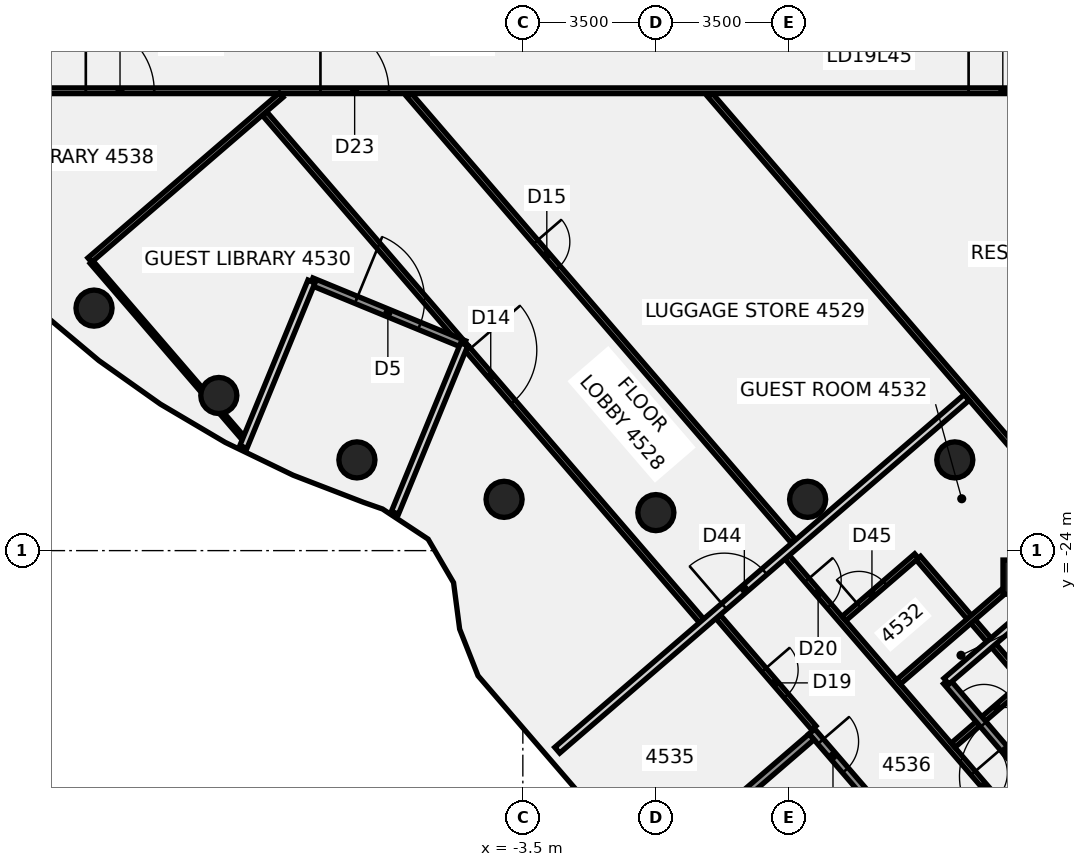
"""IFC4 building model, lengths in metres.
Left out: names, types, materials, properties, quantities, classifications, styles, units other than length and angle.
Written with IfcOpenShell. Run it as: python <this file> out.ifc"""

import sys

from ifc_helpers import new_model, si_unit, direction, frame, frame_2d, origin, origin_2d, place, context, subcontext, project, spatial, rectangle, circle, extrude, element, fill, save


model = new_model("IFC4")
c1 = context("Model", 3, precision=1e-05, world=origin(), true_north=direction((0.0, 1.0)))
c2 = subcontext(c1, "Body", "Model", "MODEL_VIEW")
j1 = project(units=[si_unit("LENGTHUNIT", "METRE"), si_unit("PLANEANGLEUNIT", "RADIAN")], contexts=[c1])
p1 = place(None, origin())
s1 = spatial("IfcSite", under=j1, at=p1, CompositionType="ELEMENT")
p2 = place(p1, origin())
s2 = spatial("IfcBuilding", under=s1, at=p2, CompositionType="ELEMENT")
p3 = place(p2, frame((0.0, 0.0, 182.5)))
s3 = spatial("IfcBuildingStorey", under=s2, at=p3, CompositionType="ELEMENT", Elevation=182.5)
for number, where, z_axis, x_axis in (
    (1, (-14.784, -17.619, -0.14), (0.0, 0.0, 1.0), (1.0, 0.0, 0.0)),
    (2, (-11.5, -19.919, -0.14), (0.0, 0.0, 1.0), (1.0, 0.0, 0.0)),
    (3, (-7.866, -21.613, -0.14), (0.0, 0.0, 1.0), (1.0, 0.0, 0.0)),
    (4, (-3.994, -22.651, -0.14), (0.0, 0.0, 1.0), (1.0, 0.0, 0.0)),
    (5, (0.0, -23.0, -0.14), (0.0, 0.0, 1.0), (1.0, 0.0, 0.0)),
    (6, (3.994, -22.651, -0.14), (0.0, 0.0, 1.0), (1.0, 0.0, 0.0)),
    (7, (7.866, -21.613, -0.14), (0.0, 0.0, 1.0), (1.0, 0.0, 0.0)),
):
    element("IfcColumn", number, at=place(p3, frame(where, z_axis=z_axis, x_axis=x_axis)), inside=s3, PredefinedType="COLUMN", context=c2, shape_type="SweptSolid", body=[
        extrude(circle(Radius=0.475, at=origin_2d()), origin(), (0.0, 0.0, 1.0), 3.6),
    ])
p4 = place(p3, frame((9.584, -24.698, -0.135), z_axis=(0.013229584391, 0.048576320124, 0.998731855515), x_axis=(-0.757717932984, -0.651247732409, 0.04171240903)))
e8 = element("IfcColumn", 8, at=p4, inside=s3, PredefinedType="COLUMN", context=c2, shape_type="SweptSolid", body=[
    extrude(rectangle(XDim=0.9, YDim=0.9, at=origin_2d()), origin(), (0.0, 0.0, 1.0), 3.599),
])
p5 = place(p3, frame((-14.847, -16.411, 0.0), z_axis=(0.0, 0.0, 1.0), x_axis=(0.652680882715, -0.757632935753, 0.0)))
e9 = element("IfcWall", 9, at=p5, inside=s3, PredefinedType="PARTITIONING", context=c2, shape_type="SweptSolid", body=[
    extrude(rectangle(XDim=4.443, YDim=0.1, at=frame_2d((2.222, 0.0))), origin(), (0.0, 0.0, 1.0), 2.864),
])
p6 = place(p3, frame((-11.425, -20.383, 0.0), z_axis=(0.0, 0.0, 1.0), x_axis=(0.652545214722, -0.757749789009, 0.0)))
e10 = element("IfcWall", 10, at=p6, inside=s3, PredefinedType="PARTITIONING", context=c2, shape_type="SweptSolid", body=[
    extrude(rectangle(XDim=0.882, YDim=0.1, at=frame_2d((0.441, 0.0))), origin(), (0.0, 0.0, 1.0), 2.864),
])
p7 = place(p3, frame((-10.298, -12.499, 0.0), z_axis=(0.0, 0.0, 1.0), x_axis=(0.652713185698, -0.757605106382, 0.0)))
e11 = element("IfcWall", 11, at=p7, inside=s3, PredefinedType="PARTITIONING", context=c2, shape_type="SweptSolid", body=[
    extrude(rectangle(XDim=17.62, YDim=0.15, at=frame_2d((8.81, 0.0))), origin(), (0.0, 0.0, 1.0), 2.864),
])
p8 = place(p7, frame((8.22, 0.0, 0.0)))
e12 = element("IfcOpeningElement", 12, at=p8, cuts=e11, PredefinedType="OPENING", context=c2, shape_type="SweptSolid", body=[
    extrude(rectangle(XDim=1.8, YDim=2.1, at=frame_2d((0.9, 1.05))), frame((0.0, 0.085, 0.0), z_axis=(0.0, -1.0, 0.0), x_axis=(1.0, 0.0, 0.0)), (0.0, 0.0, 1.0), 0.17),
])
p9 = place(p3, frame((-6.499, -12.006, 0.0), z_axis=(0.0, 0.0, 1.0), x_axis=(0.65272794867, -0.757592387122, 0.0)))
e13 = element("IfcWall", 13, at=p9, inside=s3, PredefinedType="PARTITIONING", context=c2, shape_type="SweptSolid", body=[
    extrude(rectangle(XDim=15.494, YDim=0.15, at=frame_2d((7.747, 0.0))), origin(), (0.0, 0.0, 1.0), 2.864),
])
p10 = place(p9, frame((5.11, 0.0, 0.0)))
e14 = element("IfcOpeningElement", 14, at=p10, cuts=e13, PredefinedType="OPENING", context=c2, shape_type="SweptSolid", body=[
    extrude(rectangle(XDim=0.9, YDim=2.1, at=frame_2d((0.45, 1.05))), frame((0.0, 0.085, 0.0), z_axis=(0.0, -1.0, 0.0), x_axis=(1.0, 0.0, 0.0)), (0.0, 0.0, 1.0), 0.17),
])
p11 = place(p3, frame((1.421, -12.006, 0.0), z_axis=(0.0, 0.0, 1.0), x_axis=(0.652713345428, -0.757604968767, 0.0)))
e15 = element("IfcWall", 15, at=p11, inside=s3, PredefinedType="PARTITIONING", context=c2, shape_type="SweptSolid", body=[
    extrude(rectangle(XDim=14.473, YDim=0.15, at=frame_2d((7.236, 0.0))), origin(), (0.0, 0.0, 1.0), 2.864),
])
p12 = place(p3, frame((1.636, -25.738, 0.0), z_axis=(0.0, 0.0, 1.0), x_axis=(0.652804508679, -0.757526417657, 0.0)))
e16 = element("IfcWall", 16, at=p12, inside=s3, PredefinedType="PARTITIONING", context=c2, shape_type="SweptSolid", body=[
    extrude(rectangle(XDim=3.861, YDim=0.15, at=frame_2d((1.93, 0.0))), origin(), (0.0, 0.0, 1.0), 2.864),
])
p13 = place(p12, frame((1.85, 0.0, 0.0)))
e17 = element("IfcOpeningElement", 17, at=p13, cuts=e16, PredefinedType="OPENING", context=c2, shape_type="SweptSolid", body=[
    extrude(rectangle(XDim=0.9, YDim=2.1, at=frame_2d((0.45, 1.05))), frame((0.0, 0.085, 0.0), z_axis=(0.0, -1.0, 0.0), x_axis=(1.0, 0.0, 0.0)), (0.0, 0.0, 1.0), 0.17),
])
p14 = place(p3, frame((3.454, -24.172, 0.0), z_axis=(0.0, 0.0, 1.0), x_axis=(0.652748517357, -0.757574665025, 0.0)))
e18 = element("IfcWall", 18, at=p14, inside=s3, PredefinedType="PARTITIONING", context=c2, shape_type="SweptSolid", body=[
    extrude(rectangle(XDim=13.32, YDim=0.15, at=frame_2d((6.66, 0.0))), origin(), (0.0, 0.0, 1.0), 2.864),
])
p15 = place(p14, frame((0.8, 0.0, 0.0)))
e19 = element("IfcOpeningElement", 19, at=p15, cuts=e18, PredefinedType="OPENING", context=c2, shape_type="SweptSolid", body=[
    extrude(rectangle(XDim=0.9, YDim=2.1, at=frame_2d((0.45, 1.05))), frame((0.0, 0.085, 0.0), z_axis=(0.0, -1.0, 0.0), x_axis=(1.0, 0.0, 0.0)), (0.0, 0.0, 1.0), 0.17),
])
p16 = place(p14, frame((7.5, 0.0, 0.0)))
e20 = element("IfcOpeningElement", 20, at=p16, cuts=e18, PredefinedType="OPENING", context=c2, shape_type="SweptSolid", body=[
    extrude(rectangle(XDim=0.9, YDim=2.1, at=frame_2d((0.45, 1.05))), frame((0.0, 0.085, 0.0), z_axis=(0.0, -1.0, 0.0), x_axis=(1.0, 0.0, 0.0)), (0.0, 0.0, 1.0), 0.17),
])
p17 = place(p14, frame((9.8, 0.0, 0.0)))
e21 = element("IfcOpeningElement", 21, at=p17, cuts=e18, PredefinedType="OPENING", context=c2, shape_type="SweptSolid", body=[
    extrude(rectangle(XDim=0.9, YDim=2.1, at=frame_2d((0.45, 1.05))), frame((0.0, 0.085, 0.0), z_axis=(0.0, -1.0, 0.0), x_axis=(1.0, 0.0, 0.0)), (0.0, 0.0, 1.0), 0.17),
])
p18 = place(p3, frame((6.909, -24.198, 0.0), z_axis=(0.0, 0.0, 1.0), x_axis=(0.652677065628, -0.757636224057, 0.0)))
e22 = element("IfcWall", 22, at=p18, inside=s3, PredefinedType="PARTITIONING", context=c2, shape_type="SweptSolid", body=[
    extrude(rectangle(XDim=4.25, YDim=0.15, at=frame_2d((2.125, 0.0))), origin(), (0.0, 0.0, 1.0), 2.864),
])
p19 = place(p3, frame((-17.1, -11.9, 0.0), z_axis=(0.0, 0.0, 1.0), x_axis=(1.0, 0.0, 0.0)))
e23 = element("IfcWall", 23, at=p19, inside=s3, PredefinedType="PARTITIONING", context=c2, shape_type="SweptSolid", body=[
    extrude(rectangle(XDim=34.165, YDim=0.15, at=frame_2d((17.083, 0.0))), origin(), (0.0, 0.0, 1.0), 2.864),
])
p20 = place(p19, frame((8.274, 0.0, 0.0)))
e24 = element("IfcOpeningElement", 24, at=p20, cuts=e23, PredefinedType="OPENING", context=c2, shape_type="SweptSolid", body=[
    extrude(rectangle(XDim=1.8, YDim=2.1, at=frame_2d((0.9, 1.05))), frame((0.0, 0.085, 0.0), z_axis=(0.0, -1.0, 0.0), x_axis=(1.0, 0.0, 0.0)), (0.0, 0.0, 1.0), 0.17),
])
p21 = place(p19, frame((2.1, 0.0, 0.0)))
e25 = element("IfcOpeningElement", 25, at=p21, cuts=e23, PredefinedType="OPENING", context=c2, shape_type="SweptSolid", body=[
    extrude(rectangle(XDim=1.8, YDim=2.1, at=frame_2d((0.9, 1.05))), frame((0.0, 0.085, 0.0), z_axis=(0.0, -1.0, 0.0), x_axis=(1.0, 0.0, 0.0)), (0.0, 0.0, 1.0), 0.17),
])
p22 = place(p19, frame((25.33, 0.0, 0.0)))
e26 = element("IfcOpeningElement", 26, at=p22, cuts=e23, PredefinedType="OPENING", context=c2, shape_type="SweptSolid", body=[
    extrude(rectangle(XDim=1.8, YDim=2.1, at=frame_2d((0.9, 1.05))), frame((0.0, 0.085, 0.0), z_axis=(0.0, -1.0, 0.0), x_axis=(1.0, 0.0, 0.0)), (0.0, 0.0, 1.0), 0.17),
])
p23 = place(p3, frame((-14.896, -16.354, 0.0), z_axis=(0.0, 0.0, 1.0), x_axis=(0.757644724188, 0.652667198432, 0.0)))
e27 = element("IfcWall", 27, at=p23, inside=s3, PredefinedType="PARTITIONING", context=c2, shape_type="SweptSolid", body=[
    extrude(rectangle(XDim=6.649, YDim=0.15, at=frame_2d((3.324, 0.0))), origin(), (0.0, 0.0, 1.0), 2.864),
])
p24 = place(p3, frame((-2.595, -29.251, 0.0), z_axis=(0.0, 0.0, 1.0), x_axis=(0.757604641141, 0.652713725704, 0.0)))
e28 = element("IfcWall", 28, at=p24, inside=s3, PredefinedType="PARTITIONING", context=c2, shape_type="SweptSolid", body=[
    extrude(rectangle(XDim=14.219, YDim=0.2, at=frame_2d((7.109, 0.0))), origin(), (0.0, 0.0, 1.0), 2.864),
])
p25 = place(p24, frame((5.799, 0.0, 0.0)))
e29 = element("IfcOpeningElement", 29, at=p25, cuts=e28, PredefinedType="OPENING", context=c2, shape_type="SweptSolid", body=[
    extrude(rectangle(XDim=1.4, YDim=2.1, at=frame_2d((0.7, 1.05))), frame((0.0, 0.11, 0.0), z_axis=(0.0, -1.0, 0.0), x_axis=(1.0, 0.0, 0.0)), (0.0, 0.0, 1.0), 0.22),
])
p26 = place(p3, frame((4.952, -25.786, 0.0), z_axis=(0.0, 0.0, 1.0), x_axis=(0.757495885979, 0.652839936528, 0.0)))
e30 = element("IfcWall", 30, at=p26, inside=s3, PredefinedType="PARTITIONING", context=c2, shape_type="SweptSolid", body=[
    extrude(rectangle(XDim=2.52, YDim=0.15, at=frame_2d((1.26, 0.0))), origin(), (0.0, 0.0, 1.0), 2.864),
])
p27 = place(p26, frame((0.52, 0.0, 0.0)))
e31 = element("IfcOpeningElement", 31, at=p27, cuts=e30, PredefinedType="OPENING", context=c2, shape_type="SweptSolid", body=[
    extrude(rectangle(XDim=0.9, YDim=2.1, at=frame_2d((0.45, 1.05))), frame((0.0, 0.085, 0.0), z_axis=(0.0, -1.0, 0.0), x_axis=(1.0, 0.0, 0.0)), (0.0, 0.0, 1.0), 0.17),
])
p28 = place(p3, frame((6.388, -27.453, 0.0), z_axis=(0.0, 0.0, 1.0), x_axis=(0.757450861075, 0.652892175674, 0.0)))
e32 = element("IfcWall", 32, at=p28, inside=s3, PredefinedType="PARTITIONING", context=c2, shape_type="SweptSolid", body=[
    extrude(rectangle(XDim=3.766, YDim=0.15, at=frame_2d((1.883, 0.0))), origin(), (0.0, 0.0, 1.0), 2.864),
])
p29 = place(p3, frame((7.823, -29.119, 0.0), z_axis=(0.0, 0.0, 1.0), x_axis=(0.757495885979, 0.652839936528, 0.0)))
e33 = element("IfcWall", 33, at=p29, inside=s3, PredefinedType="PARTITIONING", context=c2, shape_type="SweptSolid", body=[
    extrude(rectangle(XDim=2.52, YDim=0.15, at=frame_2d((1.26, 0.0))), origin(), (0.0, 0.0, 1.0), 2.864),
])
p30 = place(p29, frame((1.07, 0.0, 0.0)))
e34 = element("IfcOpeningElement", 34, at=p30, cuts=e33, PredefinedType="OPENING", context=c2, shape_type="SweptSolid", body=[
    extrude(rectangle(XDim=0.9, YDim=2.1, at=frame_2d((0.45, 1.05))), frame((0.0, 0.085, 0.0), z_axis=(0.0, -1.0, 0.0), x_axis=(1.0, 0.0, 0.0)), (0.0, 0.0, 1.0), 0.17),
])
p31 = place(p3, frame((10.049, -30.244, 0.0), z_axis=(0.0, 0.0, 1.0), x_axis=(-0.650312392962, 0.759666895132, 0.0)))
e35 = element("IfcWall", 35, at=p31, inside=s3, PredefinedType="SOLIDWALL", context=c2, shape_type="SweptSolid", body=[
    extrude(rectangle(XDim=3.695, YDim=0.2, at=frame_2d((1.847, 0.0))), origin(), (0.0, 0.0, 1.0), 3.014),
])
p32 = place(p31, frame((0.4, 0.0, 0.0)))
e36 = element("IfcOpeningElement", 36, at=p32, cuts=e35, PredefinedType="OPENING", context=c2, shape_type="SweptSolid", body=[
    extrude(rectangle(XDim=1.8, YDim=2.4, at=frame_2d((0.9, 1.2))), frame((0.0, 0.11, 0.0), z_axis=(0.0, -1.0, 0.0), x_axis=(1.0, 0.0, 0.0)), (0.0, 0.0, 1.0), 0.22),
])
p33 = place(p3, frame((7.646, -27.437, 0.0), z_axis=(0.0, 0.0, 1.0), x_axis=(0.759635869727, 0.650348633752, 0.0)))
e37 = element("IfcWall", 37, at=p33, inside=s3, PredefinedType="SOLIDWALL", context=c2, shape_type="SweptSolid", body=[
    extrude(rectangle(XDim=4.906, YDim=0.2, at=frame_2d((2.453, 0.0))), origin(), (0.0, 0.0, 1.0), 3.014),
])
p34 = place(p3, frame((-9.062, -16.918, 0.0), z_axis=(0.0, 0.0, 1.0), x_axis=(0.924739730044, -0.380600094164, 0.0)))
e38 = element("IfcWall", 38, at=p34, inside=s3, PredefinedType="SOLIDWALL", context=c2, shape_type="SweptSolid", body=[
    extrude(rectangle(XDim=4.347, YDim=0.2, at=frame_2d((2.174, 0.0))), origin(), (0.0, 0.0, 1.0), 3.46),
])
p35 = place(p34, frame((1.273, 0.0, 0.0)))
e39 = element("IfcOpeningElement", 39, at=p35, cuts=e38, PredefinedType="OPENING", context=c2, shape_type="SweptSolid", body=[
    extrude(rectangle(XDim=1.8, YDim=2.4, at=frame_2d((0.9, 1.2))), frame((0.0, 0.11, 0.0), z_axis=(0.0, -1.0, 0.0), x_axis=(1.0, 0.0, 0.0)), (0.0, 0.0, 1.0), 0.22),
])
p36 = place(p3, frame((-9.062, -16.918, 0.0), z_axis=(0.0, 0.0, 1.0), x_axis=(-0.380580288667, -0.924747881251, 0.0)))
e40 = element("IfcWall", 40, at=p36, inside=s3, PredefinedType="SOLIDWALL", context=c2, shape_type="SweptSolid", body=[
    extrude(rectangle(XDim=4.708, YDim=0.2, at=frame_2d((2.354, 0.0))), origin(), (0.0, 0.0, 1.0), 3.46),
])
p37 = place(p3, frame((-5.042, -18.572, 0.0), z_axis=(0.0, 0.0, 1.0), x_axis=(-0.380570406195, -0.924751948324, 0.0)))
e41 = element("IfcWall", 41, at=p37, inside=s3, PredefinedType="SOLIDWALL", context=c2, shape_type="SweptSolid", body=[
    extrude(rectangle(XDim=4.792, YDim=0.2, at=frame_2d((2.396, 0.0))), origin(), (0.0, 0.0, 1.0), 3.46),
])
p38 = place(p3, frame((4.106, -28.758, -0.14), z_axis=(0.0, 0.0, 1.0), x_axis=(0.652703877257, -0.757613125952, 0.0)))
e42 = element("IfcWall", 42, at=p38, inside=s3, PredefinedType="SHEAR", context=c2, shape_type="SweptSolid", body=[
    extrude(rectangle(XDim=6.7, YDim=0.2, at=frame_2d((3.35, 0.0))), origin(), (0.0, 0.0, 1.0), 3.004),
])
p39 = place(p38, frame((0.35, 0.0, 0.0)))
e43 = element("IfcOpeningElement", 43, at=p39, cuts=e42, PredefinedType="OPENING", context=c2, shape_type="SweptSolid", body=[
    extrude(rectangle(XDim=1.0, YDim=2.1, at=frame_2d((0.5, 1.05))), frame((0.0, 0.11, 0.0), z_axis=(0.0, -1.0, 0.0), x_axis=(1.0, 0.0, 0.0)), (0.0, 0.0, 1.0), 0.22),
])
p40 = place(p3, frame((1.672, -30.988, -0.14), z_axis=(0.0, 0.0, 1.0), x_axis=(0.75757386542, 0.652749445371, 0.0)))
e44 = element("IfcWall", 44, at=p40, inside=s3, PredefinedType="SHEAR", context=c2, shape_type="SweptSolid", body=[
    extrude(rectangle(XDim=3.2, YDim=0.2, at=frame_2d((1.6, 0.0))), origin(), (0.0, 0.0, 1.0), 3.004),
])
p41 = place(p8, frame((1.8, 0.0, 0.0), z_axis=(0.0, 0.0, 1.0), x_axis=(-1.0, 0.0, 0.0)))
e45 = element("IfcDoor", 45, at=p41, inside=s3, OperationType="DOUBLE_DOOR_SINGLE_SWING", PredefinedType="DOOR", context=c2, shape_type="SweptSolid", body=[
    extrude(rectangle(XDim=1.8, YDim=2.1, at=frame_2d((0.9, 1.05))), frame((0.0, 0.025, 0.0), z_axis=(0.0, -1.0, 0.0), x_axis=(1.0, 0.0, 0.0)), (0.0, 0.0, 1.0), 0.05),
])
fill(e12, e45)
p42 = place(p10, origin())
e46 = element("IfcDoor", 46, at=p42, inside=s3, OperationType="SINGLE_SWING_RIGHT", PredefinedType="DOOR", context=c2, shape_type="SweptSolid", body=[
    extrude(rectangle(XDim=0.9, YDim=2.1, at=frame_2d((0.45, 1.05))), frame((0.0, 0.025, 0.0), z_axis=(0.0, -1.0, 0.0), x_axis=(1.0, 0.0, 0.0)), (0.0, 0.0, 1.0), 0.05),
])
fill(e14, e46)
p43 = place(p13, frame((0.9, 0.0, 0.0), z_axis=(0.0, 0.0, 1.0), x_axis=(-1.0, 0.0, 0.0)))
e47 = element("IfcDoor", 47, at=p43, inside=s3, OperationType="SINGLE_SWING_RIGHT", PredefinedType="DOOR", context=c2, shape_type="SweptSolid", body=[
    extrude(rectangle(XDim=0.9, YDim=2.1, at=frame_2d((0.45, 1.05))), frame((0.0, 0.025, 0.0), z_axis=(0.0, -1.0, 0.0), x_axis=(1.0, 0.0, 0.0)), (0.0, 0.0, 1.0), 0.05),
])
fill(e17, e47)
p44 = place(p15, origin())
e48 = element("IfcDoor", 48, at=p44, inside=s3, OperationType="SINGLE_SWING_RIGHT", PredefinedType="DOOR", context=c2, shape_type="SweptSolid", body=[
    extrude(rectangle(XDim=0.9, YDim=2.1, at=frame_2d((0.45, 1.05))), frame((0.0, 0.025, 0.0), z_axis=(0.0, -1.0, 0.0), x_axis=(1.0, 0.0, 0.0)), (0.0, 0.0, 1.0), 0.05),
])
fill(e19, e48)
p45 = place(p16, origin())
e49 = element("IfcDoor", 49, at=p45, inside=s3, OperationType="SINGLE_SWING_LEFT", PredefinedType="DOOR", context=c2, shape_type="SweptSolid", body=[
    extrude(rectangle(XDim=0.9, YDim=2.1, at=frame_2d((0.45, 1.05))), frame((0.0, 0.025, 0.0), z_axis=(0.0, -1.0, 0.0), x_axis=(1.0, 0.0, 0.0)), (0.0, 0.0, 1.0), 0.05),
])
fill(e20, e49)
p46 = place(p20, origin())
e50 = element("IfcDoor", 50, at=p46, inside=s3, OperationType="DOUBLE_DOOR_SINGLE_SWING", PredefinedType="DOOR", context=c2, shape_type="SweptSolid", body=[
    extrude(rectangle(XDim=1.8, YDim=2.1, at=frame_2d((0.9, 1.05))), frame((0.0, 0.025, 0.0), z_axis=(0.0, -1.0, 0.0), x_axis=(1.0, 0.0, 0.0)), (0.0, 0.0, 1.0), 0.05),
])
fill(e24, e50)
p47 = place(p21, frame((1.8, 0.0, 0.0), z_axis=(0.0, 0.0, 1.0), x_axis=(-1.0, 0.0, 0.0)))
e51 = element("IfcDoor", 51, at=p47, inside=s3, OperationType="DOUBLE_DOOR_SINGLE_SWING", PredefinedType="DOOR", context=c2, shape_type="SweptSolid", body=[
    extrude(rectangle(XDim=1.8, YDim=2.1, at=frame_2d((0.9, 1.05))), frame((0.0, 0.025, 0.0), z_axis=(0.0, -1.0, 0.0), x_axis=(1.0, 0.0, 0.0)), (0.0, 0.0, 1.0), 0.05),
])
fill(e25, e51)
p48 = place(p22, origin())
e52 = element("IfcDoor", 52, at=p48, inside=s3, OperationType="DOUBLE_DOOR_SINGLE_SWING", PredefinedType="DOOR", context=c2, shape_type="SweptSolid", body=[
    extrude(rectangle(XDim=1.8, YDim=2.1, at=frame_2d((0.9, 1.05))), frame((0.0, 0.025, 0.0), z_axis=(0.0, -1.0, 0.0), x_axis=(1.0, 0.0, 0.0)), (0.0, 0.0, 1.0), 0.05),
])
fill(e26, e52)
p49 = place(p25, origin())
e53 = element("IfcDoor", 53, at=p49, inside=s3, OperationType="DOUBLE_DOOR_SINGLE_SWING", PredefinedType="DOOR", context=c2, shape_type="SweptSolid", body=[
    extrude(rectangle(XDim=1.4, YDim=2.1, at=frame_2d((0.7, 1.05))), frame((0.0, 0.025, 0.0), z_axis=(0.0, -1.0, 0.0), x_axis=(1.0, 0.0, 0.0)), (0.0, 0.0, 1.0), 0.05),
])
fill(e29, e53)
p50 = place(p27, frame((0.9, 0.0, 0.0), z_axis=(0.0, 0.0, 1.0), x_axis=(-1.0, 0.0, 0.0)))
e54 = element("IfcDoor", 54, at=p50, inside=s3, OperationType="SINGLE_SWING_LEFT", PredefinedType="DOOR", context=c2, shape_type="SweptSolid", body=[
    extrude(rectangle(XDim=0.9, YDim=2.1, at=frame_2d((0.45, 1.05))), frame((0.0, 0.025, 0.0), z_axis=(0.0, -1.0, 0.0), x_axis=(1.0, 0.0, 0.0)), (0.0, 0.0, 1.0), 0.05),
])
fill(e31, e54)
p51 = place(p30, origin())
e55 = element("IfcDoor", 55, at=p51, inside=s3, OperationType="SINGLE_SWING_RIGHT", PredefinedType="DOOR", context=c2, shape_type="SweptSolid", body=[
    extrude(rectangle(XDim=0.9, YDim=2.1, at=frame_2d((0.45, 1.05))), frame((0.0, 0.025, 0.0), z_axis=(0.0, -1.0, 0.0), x_axis=(1.0, 0.0, 0.0)), (0.0, 0.0, 1.0), 0.05),
])
fill(e34, e55)
p52 = place(p32, origin())
e56 = element("IfcDoor", 56, at=p52, inside=s3, OperationType="SINGLE_SWING_LEFT", PredefinedType="DOOR", context=c2, shape_type="SweptSolid", body=[
    extrude(rectangle(XDim=1.8, YDim=2.4, at=frame_2d((0.9, 1.2))), frame((0.0, 0.025, 0.0), z_axis=(0.0, -1.0, 0.0), x_axis=(1.0, 0.0, 0.0)), (0.0, 0.0, 1.0), 0.05),
])
fill(e36, e56)
p53 = place(p35, origin())
e57 = element("IfcDoor", 57, at=p53, inside=s3, OperationType="SINGLE_SWING_LEFT", PredefinedType="DOOR", context=c2, shape_type="SweptSolid", body=[
    extrude(rectangle(XDim=1.8, YDim=2.4, at=frame_2d((0.9, 1.2))), frame((0.0, 0.025, 0.0), z_axis=(0.0, -1.0, 0.0), x_axis=(1.0, 0.0, 0.0)), (0.0, 0.0, 1.0), 0.05),
])
fill(e39, e57)
p54 = place(p39, origin())
e58 = element("IfcDoor", 58, at=p54, inside=s3, OperationType="SINGLE_SWING_LEFT", PredefinedType="DOOR", context=c2, shape_type="SweptSolid", body=[
    extrude(rectangle(XDim=1.0, YDim=2.1, at=frame_2d((0.5, 1.05))), frame((0.0, 0.025, 0.0), z_axis=(0.0, -1.0, 0.0), x_axis=(1.0, 0.0, 0.0)), (0.0, 0.0, 1.0), 0.05),
])
fill(e43, e58)
save(model, sys.argv[1])
